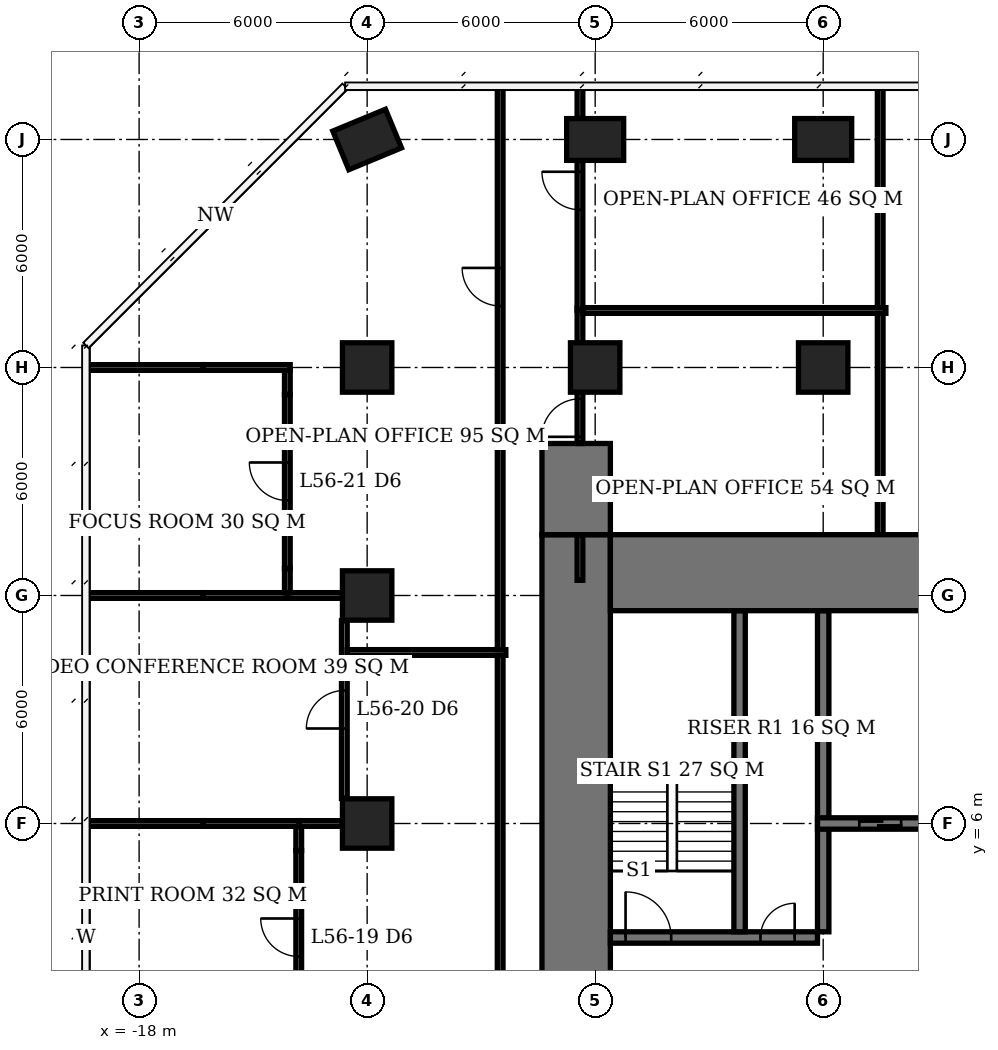
"""IFC4 building model, lengths in metres.
Left out: names, types, materials, properties, quantities, classifications, styles, units other than length and angle.
Written with IfcOpenShell. Run it as: python <this file> out.ifc"""

import sys

from ifc_helpers import new_model, si_unit, direction, frame, frame_2d, origin, origin_2d, place, context, subcontext, project, spatial, rectangle, extrude, element, fill, save


model = new_model("IFC4")
c1 = context("Model", 3, precision=1e-05, world=origin(), true_north=direction((0.0, 1.0)))
c2 = subcontext(c1, "Body", "Model", "MODEL_VIEW")
j1 = project(units=[si_unit("LENGTHUNIT", "METRE"), si_unit("PLANEANGLEUNIT", "RADIAN")], contexts=[c1])
p1 = place(None, origin())
s1 = spatial("IfcSite", under=j1, at=p1, CompositionType="ELEMENT")
p2 = place(p1, origin())
s2 = spatial("IfcBuilding", under=s1, at=p2, CompositionType="ELEMENT")
p3 = place(p2, frame((0.0, 0.0, 227.9)))
s3 = spatial("IfcBuildingStorey", under=s2, at=p3, CompositionType="ELEMENT", Elevation=227.9)
for number, where, z_axis, x_axis in (
    (1, (-12.0, 6.0, 0.0), (0.0, 0.0, 1.0), (1.0, 0.0, 0.0)),
    (2, (-12.0, 12.0, 0.0), (0.0, 0.0, 1.0), (1.0, 0.0, 0.0)),
    (3, (-12.0, 18.0, 0.0), (0.0, 0.0, 1.0), (1.0, 0.0, 0.0)),
):
    element("IfcColumn", number, at=place(p3, frame(where, z_axis=z_axis, x_axis=x_axis)), inside=s3, PredefinedType="COLUMN", context=c2, shape_type="SweptSolid", body=[
        extrude(rectangle(XDim=1.3, YDim=1.3, at=origin_2d()), origin(), (0.0, 0.0, 1.0), 3.9),
    ])
p4 = place(p3, frame((-12.0, 24.0, 0.0), z_axis=(0.0, 0.0, 1.0), x_axis=(0.923879532511, 0.382683432365, 0.0)))
e4 = element("IfcColumn", 4, at=p4, inside=s3, PredefinedType="COLUMN", context=c2, shape_type="SweptSolid", body=[
    extrude(rectangle(XDim=1.5, YDim=1.1, at=origin_2d()), origin(), (0.0, 0.0, 1.0), 3.9),
])
p5 = place(p3, frame((-6.0, 18.0, 0.0), z_axis=(0.0, 0.0, 1.0), x_axis=(1.0, 0.0, 0.0)))
e5 = element("IfcColumn", 5, at=p5, inside=s3, PredefinedType="COLUMN", context=c2, shape_type="SweptSolid", body=[
    extrude(rectangle(XDim=1.3, YDim=1.3, at=origin_2d()), origin(), (0.0, 0.0, 1.0), 3.9),
])
p6 = place(p3, frame((-6.0, 24.0, 0.0), z_axis=(0.0, 0.0, 1.0), x_axis=(1.0, 0.0, 0.0)))
e6 = element("IfcColumn", 6, at=p6, inside=s3, PredefinedType="COLUMN", context=c2, shape_type="SweptSolid", body=[
    extrude(rectangle(XDim=1.5, YDim=1.1, at=origin_2d()), origin(), (0.0, 0.0, 1.0), 3.9),
])
p7 = place(p3, frame((0.0, 18.0, 0.0), z_axis=(0.0, 0.0, 1.0), x_axis=(1.0, 0.0, 0.0)))
e7 = element("IfcColumn", 7, at=p7, inside=s3, PredefinedType="COLUMN", context=c2, shape_type="SweptSolid", body=[
    extrude(rectangle(XDim=1.3, YDim=1.3, at=origin_2d()), origin(), (0.0, 0.0, 1.0), 3.9),
])
p8 = place(p3, frame((0.0, 24.0, 0.0), z_axis=(0.0, 0.0, 1.0), x_axis=(1.0, 0.0, 0.0)))
e8 = element("IfcColumn", 8, at=p8, inside=s3, PredefinedType="COLUMN", context=c2, shape_type="SweptSolid", body=[
    extrude(rectangle(XDim=1.5, YDim=1.1, at=origin_2d()), origin(), (0.0, 0.0, 1.0), 3.9),
])
p9 = place(p3, frame((-5.6, 12.6, 0.0), z_axis=(0.0, 0.0, 1.0), x_axis=(1.0, 0.0, 0.0)))
e9 = element("IfcWall", 9, at=p9, inside=s3, PredefinedType="SHEAR", context=c2, shape_type="SweptSolid", body=[
    extrude(rectangle(XDim=23.2, YDim=2.0, at=frame_2d((11.6, 0.0))), origin(), (0.0, 0.0, 1.0), 3.9),
])
p10 = place(p3, frame((-6.5, -7.6, 0.0), z_axis=(0.0, 0.0, 1.0), x_axis=(0.0, 1.0, 0.0)))
e10 = element("IfcWall", 10, at=p10, inside=s3, PredefinedType="SHEAR", context=c2, shape_type="SweptSolid", body=[
    extrude(rectangle(XDim=21.2, YDim=1.8, at=frame_2d((10.6, 0.0))), origin(), (0.0, 0.0, 1.0), 3.9),
])
p11 = place(p10, frame((7.8, 0.0, 0.0)))
e11 = element("IfcOpeningElement", 11, at=p11, cuts=e10, PredefinedType="OPENING", context=c2, shape_type="SweptSolid", body=[
    extrude(rectangle(XDim=1.8, YDim=2.4, at=frame_2d((0.9, 1.2))), frame((0.0, 0.91, 0.0), z_axis=(0.0, -1.0, 0.0), x_axis=(1.0, 0.0, 0.0)), (0.0, 0.0, 1.0), 1.82),
])
p12 = place(p3, frame((-6.5, 13.6, 0.0), z_axis=(0.0, 0.0, 1.0), x_axis=(0.0, 1.0, 0.0)))
e12 = element("IfcWall", 12, at=p12, inside=s3, PredefinedType="SHEAR", context=c2, shape_type="SweptSolid", body=[
    extrude(rectangle(XDim=2.4, YDim=1.8, at=frame_2d((1.2, 0.0))), origin(), (0.0, 0.0, 1.0), 3.9),
])
p13 = place(p3, frame((-5.6, 3.0, 0.0), z_axis=(0.0, 0.0, 1.0), x_axis=(1.0, 0.0, 0.0)))
e13 = element("IfcWall", 13, at=p13, inside=s3, PredefinedType="SHEAR", context=c2, shape_type="SweptSolid", body=[
    extrude(rectangle(XDim=5.45, YDim=0.3, at=frame_2d((2.725, 0.0))), origin(), (0.0, 0.0, 1.0), 3.9),
])
p14 = place(p13, frame((0.4, 0.0, 0.0)))
e14 = element("IfcOpeningElement", 14, at=p14, cuts=e13, PredefinedType="OPENING", context=c2, shape_type="SweptSolid", body=[
    extrude(rectangle(XDim=1.2, YDim=2.1, at=frame_2d((0.6, 1.05))), frame((0.0, 0.16, 0.0), z_axis=(0.0, -1.0, 0.0), x_axis=(1.0, 0.0, 0.0)), (0.0, 0.0, 1.0), 0.32),
])
p15 = place(p13, frame((3.95, 0.0, 0.0)))
e15 = element("IfcOpeningElement", 15, at=p15, cuts=e13, PredefinedType="OPENING", context=c2, shape_type="SweptSolid", body=[
    extrude(rectangle(XDim=0.9, YDim=2.1, at=frame_2d((0.45, 1.05))), frame((0.0, 0.16, 0.0), z_axis=(0.0, -1.0, 0.0), x_axis=(1.0, 0.0, 0.0)), (0.0, 0.0, 1.0), 0.32),
])
p16 = place(p3, frame((-0.15, 6.0, 0.0), z_axis=(0.0, 0.0, 1.0), x_axis=(1.0, 0.0, 0.0)))
e16 = element("IfcWall", 16, at=p16, inside=s3, PredefinedType="SHEAR", context=c2, shape_type="SweptSolid", body=[
    extrude(rectangle(XDim=17.75, YDim=0.3, at=frame_2d((8.875, 0.0))), origin(), (0.0, 0.0, 1.0), 3.9),
])
p17 = place(p16, frame((13.15, 0.0, 0.0)))
e17 = element("IfcOpeningElement", 17, at=p17, cuts=e16, PredefinedType="OPENING", context=c2, shape_type="SweptSolid", body=[
    extrude(rectangle(XDim=0.9, YDim=2.1, at=frame_2d((0.45, 1.05))), frame((0.0, 0.16, 0.0), z_axis=(0.0, -1.0, 0.0), x_axis=(1.0, 0.0, 0.0)), (0.0, 0.0, 1.0), 0.32),
])
p18 = place(p16, frame((16.25, 0.0, 0.0)))
e18 = element("IfcOpeningElement", 18, at=p18, cuts=e16, PredefinedType="OPENING", context=c2, shape_type="SweptSolid", body=[
    extrude(rectangle(XDim=1.0, YDim=2.1, at=frame_2d((0.5, 1.05))), frame((0.0, 0.16, 0.0), z_axis=(0.0, -1.0, 0.0), x_axis=(1.0, 0.0, 0.0)), (0.0, 0.0, 1.0), 0.32),
])
p19 = place(p16, frame((7.25, 0.0, 0.0)))
e19 = element("IfcOpeningElement", 19, at=p19, cuts=e16, PredefinedType="OPENING", context=c2, shape_type="SweptSolid", body=[
    extrude(rectangle(XDim=1.0, YDim=2.1, at=frame_2d((0.5, 1.05))), frame((0.0, 0.16, 0.0), z_axis=(0.0, -1.0, 0.0), x_axis=(1.0, 0.0, 0.0)), (0.0, 0.0, 1.0), 0.32),
])
p20 = place(p16, frame((1.1, 0.0, 0.0)))
e20 = element("IfcOpeningElement", 20, at=p20, cuts=e16, PredefinedType="OPENING", context=c2, shape_type="SweptSolid", body=[
    extrude(rectangle(XDim=1.1, YDim=2.1, at=frame_2d((0.55, 1.05))), frame((0.0, 0.16, 0.0), z_axis=(0.0, -1.0, 0.0), x_axis=(1.0, 0.0, 0.0)), (0.0, 0.0, 1.0), 0.32),
])
p21 = place(p16, frame((4.1, 0.0, 0.0)))
e21 = element("IfcOpeningElement", 21, at=p21, cuts=e16, PredefinedType="OPENING", context=c2, shape_type="SweptSolid", body=[
    extrude(rectangle(XDim=1.1, YDim=2.1, at=frame_2d((0.55, 1.05))), frame((0.0, 0.16, 0.0), z_axis=(0.0, -1.0, 0.0), x_axis=(1.0, 0.0, 0.0)), (0.0, 0.0, 1.0), 0.32),
])
for number, where, z_axis, x_axis in (
    (22, (0.0, 3.15, 0.0), (0.0, 0.0, 1.0), (0.0, 1.0, 0.0)),
    (23, (-2.2, 3.15, 0.0), (0.0, 0.0, 1.0), (0.0, 1.0, 0.0)),
):
    element("IfcWall", number, at=place(p3, frame(where, z_axis=z_axis, x_axis=x_axis)), inside=s3, PredefinedType="SHEAR", context=c2, shape_type="SweptSolid", body=[
        extrude(rectangle(XDim=8.45, YDim=0.3, at=frame_2d((4.225, 0.0))), origin(), (0.0, 0.0, 1.0), 3.9),
    ])
p22 = place(p3, frame((-19.35, 6.0, 0.0), z_axis=(0.0, 0.0, 1.0), x_axis=(1.0, 0.0, 0.0)))
e24 = element("IfcWall", 24, at=p22, inside=s3, PredefinedType="PARTITIONING", context=c2, shape_type="SweptSolid", body=[
    extrude(rectangle(XDim=3.04, YDim=0.15, at=frame_2d((1.52, 0.0))), origin(), (0.0, 0.0, 1.0), 3.65),
])
p23 = place(p3, frame((-16.31, 6.0, 0.0), z_axis=(0.0, 0.0, 1.0), x_axis=(1.0, 0.0, 0.0)))
e25 = element("IfcWall", 25, at=p23, inside=s3, PredefinedType="PARTITIONING", context=c2, shape_type="SweptSolid", body=[
    extrude(rectangle(XDim=2.585, YDim=0.15, at=frame_2d((1.292, 0.0))), origin(), (0.0, 0.0, 1.0), 2.65),
])
p24 = place(p3, frame((-13.8, 6.0, 0.0), z_axis=(0.0, 0.0, 1.0), x_axis=(1.0, 0.0, 0.0)))
e26 = element("IfcWall", 26, at=p24, inside=s3, PredefinedType="PARTITIONING", context=c2, shape_type="SweptSolid", body=[
    extrude(rectangle(XDim=1.15, YDim=0.15, at=frame_2d((0.575, 0.0))), origin(), (0.0, 0.0, 1.0), 2.65),
])
p25 = place(p3, frame((-19.4, 12.0, 0.0), z_axis=(0.0, 0.0, 1.0), x_axis=(1.0, 0.0, 0.0)))
e27 = element("IfcWall", 27, at=p25, inside=s3, PredefinedType="PARTITIONING", context=c2, shape_type="SweptSolid", body=[
    extrude(rectangle(XDim=3.09, YDim=0.15, at=frame_2d((1.545, 0.0))), origin(), (0.0, 0.0, 1.0), 3.65),
])
p26 = place(p3, frame((-16.31, 12.0, 0.0), z_axis=(0.0, 0.0, 1.0), x_axis=(1.0, 0.0, 0.0)))
e28 = element("IfcWall", 28, at=p26, inside=s3, PredefinedType="PARTITIONING", context=c2, shape_type="SweptSolid", body=[
    extrude(rectangle(XDim=2.285, YDim=0.15, at=frame_2d((1.143, 0.0))), origin(), (0.0, 0.0, 1.0), 2.65),
])
p27 = place(p3, frame((-14.1, 12.0, 0.0), z_axis=(0.0, 0.0, 1.0), x_axis=(1.0, 0.0, 0.0)))
e29 = element("IfcWall", 29, at=p27, inside=s3, PredefinedType="PARTITIONING", context=c2, shape_type="SweptSolid", body=[
    extrude(rectangle(XDim=1.45, YDim=0.15, at=frame_2d((0.725, 0.0))), origin(), (0.0, 0.0, 1.0), 2.65),
])
p28 = place(p3, frame((-19.4, 18.0, 0.0), z_axis=(0.0, 0.0, 1.0), x_axis=(1.0, 0.0, 0.0)))
e30 = element("IfcWall", 30, at=p28, inside=s3, PredefinedType="PARTITIONING", context=c2, shape_type="SweptSolid", body=[
    extrude(rectangle(XDim=3.09, YDim=0.15, at=frame_2d((1.545, 0.0))), origin(), (0.0, 0.0, 1.0), 3.65),
])
p29 = place(p3, frame((-16.31, 18.0, 0.0), z_axis=(0.0, 0.0, 1.0), x_axis=(1.0, 0.0, 0.0)))
e31 = element("IfcWall", 31, at=p29, inside=s3, PredefinedType="PARTITIONING", context=c2, shape_type="SweptSolid", body=[
    extrude(rectangle(XDim=2.285, YDim=0.15, at=frame_2d((1.143, 0.0))), origin(), (0.0, 0.0, 1.0), 2.65),
])
p30 = place(p3, frame((-14.1, 12.075, 0.0), z_axis=(0.0, 0.0, 1.0), x_axis=(0.0, 1.0, 0.0)))
e32 = element("IfcWall", 32, at=p30, inside=s3, PredefinedType="PARTITIONING", context=c2, shape_type="SweptSolid", body=[
    extrude(rectangle(XDim=0.635, YDim=0.15, at=frame_2d((0.317, 0.0))), origin(), (0.0, 0.0, 1.0), 2.65),
])
p31 = place(p3, frame((-14.1, 12.71, 0.0), z_axis=(0.0, 0.0, 1.0), x_axis=(0.0, 1.0, 0.0)))
e33 = element("IfcWall", 33, at=p31, inside=s3, PredefinedType="PARTITIONING", context=c2, shape_type="SweptSolid", body=[
    extrude(rectangle(XDim=4.58, YDim=0.15, at=frame_2d((2.29, 0.0))), origin(), (0.0, 0.0, 1.0), 3.65),
])
p32 = place(p31, frame((1.79, 0.0, 0.0)))
e34 = element("IfcOpeningElement", 34, at=p32, cuts=e33, PredefinedType="OPENING", context=c2, shape_type="SweptSolid", body=[
    extrude(rectangle(XDim=1.0, YDim=2.1, at=frame_2d((0.5, 1.05))), frame((0.0, 0.085, 0.0), z_axis=(0.0, -1.0, 0.0), x_axis=(1.0, 0.0, 0.0)), (0.0, 0.0, 1.0), 0.17),
])
p33 = place(p3, frame((-14.1, 17.29, 0.0), z_axis=(0.0, 0.0, 1.0), x_axis=(0.0, 1.0, 0.0)))
e35 = element("IfcWall", 35, at=p33, inside=s3, PredefinedType="PARTITIONING", context=c2, shape_type="SweptSolid", body=[
    extrude(rectangle(XDim=0.635, YDim=0.15, at=frame_2d((0.317, 0.0))), origin(), (0.0, 0.0, 1.0), 2.65),
])
p34 = place(p3, frame((-13.8, 0.71, 0.0), z_axis=(0.0, 0.0, 1.0), x_axis=(0.0, 1.0, 0.0)))
e36 = element("IfcWall", 36, at=p34, inside=s3, PredefinedType="PARTITIONING", context=c2, shape_type="SweptSolid", body=[
    extrude(rectangle(XDim=4.58, YDim=0.15, at=frame_2d((2.29, 0.0))), origin(), (0.0, 0.0, 1.0), 3.65),
])
p35 = place(p34, frame((1.79, 0.0, 0.0)))
e37 = element("IfcOpeningElement", 37, at=p35, cuts=e36, PredefinedType="OPENING", context=c2, shape_type="SweptSolid", body=[
    extrude(rectangle(XDim=1.0, YDim=2.1, at=frame_2d((0.5, 1.05))), frame((0.0, 0.085, 0.0), z_axis=(0.0, -1.0, 0.0), x_axis=(1.0, 0.0, 0.0)), (0.0, 0.0, 1.0), 0.17),
])
p36 = place(p3, frame((-13.8, 5.29, 0.0), z_axis=(0.0, 0.0, 1.0), x_axis=(0.0, 1.0, 0.0)))
e38 = element("IfcWall", 38, at=p36, inside=s3, PredefinedType="PARTITIONING", context=c2, shape_type="SweptSolid", body=[
    extrude(rectangle(XDim=0.635, YDim=0.15, at=frame_2d((0.317, 0.0))), origin(), (0.0, 0.0, 1.0), 2.65),
])
p37 = place(p3, frame((-12.6, 6.66, 0.0), z_axis=(0.0, 0.0, 1.0), x_axis=(0.0, 1.0, 0.0)))
e39 = element("IfcWall", 39, at=p37, inside=s3, PredefinedType="PARTITIONING", context=c2, shape_type="SweptSolid", body=[
    extrude(rectangle(XDim=4.68, YDim=0.15, at=frame_2d((2.34, 0.0))), origin(), (0.0, 0.0, 1.0), 3.65),
])
p38 = place(p37, frame((1.84, 0.0, 0.0)))
e40 = element("IfcOpeningElement", 40, at=p38, cuts=e39, PredefinedType="OPENING", context=c2, shape_type="SweptSolid", body=[
    extrude(rectangle(XDim=1.0, YDim=2.1, at=frame_2d((0.5, 1.05))), frame((0.0, 0.085, 0.0), z_axis=(0.0, -1.0, 0.0), x_axis=(1.0, 0.0, 0.0)), (0.0, 0.0, 1.0), 0.17),
])
p39 = place(p3, frame((-12.525, 10.5, 0.0), z_axis=(0.0, 0.0, 1.0), x_axis=(1.0, 0.0, 0.0)))
e41 = element("IfcWall", 41, at=p39, inside=s3, PredefinedType="PARTITIONING", context=c2, shape_type="SweptSolid", body=[
    extrude(rectangle(XDim=4.175, YDim=0.15, at=frame_2d((2.087, 0.0))), origin(), (0.0, 0.0, 1.0), 3.65),
])
p40 = place(p3, frame((-8.5, -12.708, 0.0), z_axis=(0.0, 0.0, 1.0), x_axis=(0.0, 1.0, 0.0)))
e42 = element("IfcWall", 42, at=p40, inside=s3, PredefinedType="PARTITIONING", context=c2, shape_type="SweptSolid", body=[
    extrude(rectangle(XDim=23.133, YDim=0.15, at=frame_2d((11.566, 0.0))), origin(), (0.0, 0.0, 1.0), 3.65),
])
p41 = place(p40, frame((12.278, 0.0, 0.0)))
e43 = element("IfcOpeningElement", 43, at=p41, cuts=e42, PredefinedType="OPENING", context=c2, shape_type="SweptSolid", body=[
    extrude(rectangle(XDim=1.0, YDim=2.1, at=frame_2d((0.5, 1.05))), frame((0.0, 0.085, 0.0), z_axis=(0.0, -1.0, 0.0), x_axis=(1.0, 0.0, 0.0)), (0.0, 0.0, 1.0), 0.17),
])
p42 = place(p3, frame((-8.5, 10.575, 0.0), z_axis=(0.0, 0.0, 1.0), x_axis=(0.0, 1.0, 0.0)))
e44 = element("IfcWall", 44, at=p42, inside=s3, PredefinedType="PARTITIONING", context=c2, shape_type="SweptSolid", body=[
    extrude(rectangle(XDim=14.825, YDim=0.15, at=frame_2d((7.413, 0.0))), origin(), (0.0, 0.0, 1.0), 3.65),
])
p43 = place(p42, frame((9.045, 0.0, 0.0)))
e45 = element("IfcOpeningElement", 45, at=p43, cuts=e44, PredefinedType="OPENING", context=c2, shape_type="SweptSolid", body=[
    extrude(rectangle(XDim=1.0, YDim=2.1, at=frame_2d((0.5, 1.05))), frame((0.0, 0.085, 0.0), z_axis=(0.0, -1.0, 0.0), x_axis=(1.0, 0.0, 0.0)), (0.0, 0.0, 1.0), 0.17),
])
p44 = place(p3, frame((-6.4, 12.4, 0.0), z_axis=(0.0, 0.0, 1.0), x_axis=(0.0, 1.0, 0.0)))
e46 = element("IfcWall", 46, at=p44, inside=s3, PredefinedType="PARTITIONING", context=c2, shape_type="SweptSolid", body=[
    extrude(rectangle(XDim=1.2, YDim=0.15, at=frame_2d((0.6, 0.0))), origin(), (0.0, 0.0, 1.0), 3.65),
])
p45 = place(p3, frame((-6.4, 16.0, 0.0), z_axis=(0.0, 0.0, 1.0), x_axis=(0.0, 1.0, 0.0)))
e47 = element("IfcWall", 47, at=p45, inside=s3, PredefinedType="PARTITIONING", context=c2, shape_type="SweptSolid", body=[
    extrude(rectangle(XDim=1.35, YDim=0.15, at=frame_2d((0.675, 0.0))), origin(), (0.0, 0.0, 1.0), 3.65),
])
p46 = place(p45, frame((0.175, 0.0, 0.0)))
e48 = element("IfcOpeningElement", 48, at=p46, cuts=e47, PredefinedType="OPENING", context=c2, shape_type="SweptSolid", body=[
    extrude(rectangle(XDim=1.0, YDim=2.1, at=frame_2d((0.5, 1.05))), frame((0.0, 0.085, 0.0), z_axis=(0.0, -1.0, 0.0), x_axis=(1.0, 0.0, 0.0)), (0.0, 0.0, 1.0), 0.17),
])
p47 = place(p3, frame((-6.4, 18.65, 0.0), z_axis=(0.0, 0.0, 1.0), x_axis=(0.0, 1.0, 0.0)))
e49 = element("IfcWall", 49, at=p47, inside=s3, PredefinedType="PARTITIONING", context=c2, shape_type="SweptSolid", body=[
    extrude(rectangle(XDim=0.925, YDim=0.15, at=frame_2d((0.462, 0.0))), origin(), (0.0, 0.0, 1.0), 3.65),
])
p48 = place(p3, frame((-6.4, 19.5, 0.0), z_axis=(0.0, 0.0, 1.0), x_axis=(0.0, 1.0, 0.0)))
e50 = element("IfcWall", 50, at=p48, inside=s3, PredefinedType="PARTITIONING", context=c2, shape_type="SweptSolid", body=[
    extrude(rectangle(XDim=3.95, YDim=0.15, at=frame_2d((1.975, 0.0))), origin(), (0.0, 0.0, 1.0), 3.65),
])
p49 = place(p48, frame((2.65, 0.0, 0.0)))
e51 = element("IfcOpeningElement", 51, at=p49, cuts=e50, PredefinedType="OPENING", context=c2, shape_type="SweptSolid", body=[
    extrude(rectangle(XDim=1.0, YDim=2.1, at=frame_2d((0.5, 1.05))), frame((0.0, 0.085, 0.0), z_axis=(0.0, -1.0, 0.0), x_axis=(1.0, 0.0, 0.0)), (0.0, 0.0, 1.0), 0.17),
])
p50 = place(p3, frame((-6.4, 24.55, 0.0), z_axis=(0.0, 0.0, 1.0), x_axis=(0.0, 1.0, 0.0)))
e52 = element("IfcWall", 52, at=p50, inside=s3, PredefinedType="PARTITIONING", context=c2, shape_type="SweptSolid", body=[
    extrude(rectangle(XDim=0.8, YDim=0.15, at=frame_2d((0.4, 0.0))), origin(), (0.0, 0.0, 1.0), 3.65),
])
p51 = place(p3, frame((-6.325, 19.5, 0.0), z_axis=(0.0, 0.0, 1.0), x_axis=(1.0, 0.0, 0.0)))
e53 = element("IfcWall", 53, at=p51, inside=s3, PredefinedType="PARTITIONING", context=c2, shape_type="SweptSolid", body=[
    extrude(rectangle(XDim=7.975, YDim=0.15, at=frame_2d((3.987, 0.0))), origin(), (0.0, 0.0, 1.0), 3.65),
])
p52 = place(p3, frame((1.5, 12.4, 0.0), z_axis=(0.0, 0.0, 1.0), x_axis=(0.0, 1.0, 0.0)))
e54 = element("IfcWall", 54, at=p52, inside=s3, PredefinedType="PARTITIONING", context=c2, shape_type="SweptSolid", body=[
    extrude(rectangle(XDim=7.025, YDim=0.15, at=frame_2d((3.513, 0.0))), origin(), (0.0, 0.0, 1.0), 3.65),
])
p53 = place(p3, frame((1.5, 19.575, 0.0), z_axis=(0.0, 0.0, 1.0), x_axis=(0.0, 1.0, 0.0)))
e55 = element("IfcWall", 55, at=p53, inside=s3, PredefinedType="PARTITIONING", context=c2, shape_type="SweptSolid", body=[
    extrude(rectangle(XDim=5.825, YDim=0.15, at=frame_2d((2.913, 0.0))), origin(), (0.0, 0.0, 1.0), 3.65),
])
p54 = place(p14, origin())
e56 = element("IfcDoor", 56, at=p54, inside=s3, OperationType="SINGLE_SWING_LEFT", PredefinedType="DOOR", context=c2, shape_type="SweptSolid", body=[
    extrude(rectangle(XDim=1.2, YDim=2.1, at=frame_2d((0.6, 1.05))), frame((0.0, 0.025, 0.0), z_axis=(0.0, -1.0, 0.0), x_axis=(1.0, 0.0, 0.0)), (0.0, 0.0, 1.0), 0.05),
])
fill(e14, e56)
p55 = place(p15, origin())
e57 = element("IfcDoor", 57, at=p55, inside=s3, OperationType="SINGLE_SWING_RIGHT", PredefinedType="DOOR", context=c2, shape_type="SweptSolid", body=[
    extrude(rectangle(XDim=0.9, YDim=2.1, at=frame_2d((0.45, 1.05))), frame((0.0, 0.025, 0.0), z_axis=(0.0, -1.0, 0.0), x_axis=(1.0, 0.0, 0.0)), (0.0, 0.0, 1.0), 0.05),
])
fill(e15, e57)
p56 = place(p20, origin())
e58 = element("IfcDoor", 58, at=p56, inside=s3, OperationType="DOUBLE_DOOR_SLIDING", PredefinedType="USERDEFINED", context=c2, shape_type="SweptSolid", body=[
    extrude(rectangle(XDim=1.1, YDim=2.1, at=frame_2d((0.55, 1.05))), frame((0.0, 0.025, 0.0), z_axis=(0.0, -1.0, 0.0), x_axis=(1.0, 0.0, 0.0)), (0.0, 0.0, 1.0), 0.05),
])
fill(e20, e58)
p57 = place(p35, origin())
e59 = element("IfcDoor", 59, at=p57, inside=s3, OperationType="SINGLE_SWING_RIGHT", PredefinedType="DOOR", context=c2, shape_type="SweptSolid", body=[
    extrude(rectangle(XDim=1.0, YDim=2.1, at=frame_2d((0.5, 1.05))), frame((0.0, 0.025, 0.0), z_axis=(0.0, -1.0, 0.0), x_axis=(1.0, 0.0, 0.0)), (0.0, 0.0, 1.0), 0.05),
])
fill(e37, e59)
p58 = place(p38, origin())
e60 = element("IfcDoor", 60, at=p58, inside=s3, OperationType="SINGLE_SWING_LEFT", PredefinedType="DOOR", context=c2, shape_type="SweptSolid", body=[
    extrude(rectangle(XDim=1.0, YDim=2.1, at=frame_2d((0.5, 1.05))), frame((0.0, 0.025, 0.0), z_axis=(0.0, -1.0, 0.0), x_axis=(1.0, 0.0, 0.0)), (0.0, 0.0, 1.0), 0.05),
])
fill(e40, e60)
p59 = place(p32, origin())
e61 = element("IfcDoor", 61, at=p59, inside=s3, OperationType="SINGLE_SWING_RIGHT", PredefinedType="DOOR", context=c2, shape_type="SweptSolid", body=[
    extrude(rectangle(XDim=1.0, YDim=2.1, at=frame_2d((0.5, 1.05))), frame((0.0, 0.025, 0.0), z_axis=(0.0, -1.0, 0.0), x_axis=(1.0, 0.0, 0.0)), (0.0, 0.0, 1.0), 0.05),
])
fill(e34, e61)
p60 = place(p43, origin())
e62 = element("IfcDoor", 62, at=p60, inside=s3, OperationType="SINGLE_SWING_RIGHT", PredefinedType="DOOR", context=c2, shape_type="SweptSolid", body=[
    extrude(rectangle(XDim=1.0, YDim=2.1, at=frame_2d((0.5, 1.05))), frame((0.0, 0.025, 0.0), z_axis=(0.0, -1.0, 0.0), x_axis=(1.0, 0.0, 0.0)), (0.0, 0.0, 1.0), 0.05),
])
fill(e45, e62)
p61 = place(p49, origin())
e63 = element("IfcDoor", 63, at=p61, inside=s3, OperationType="SINGLE_SWING_RIGHT", PredefinedType="DOOR", context=c2, shape_type="SweptSolid", body=[
    extrude(rectangle(XDim=1.0, YDim=2.1, at=frame_2d((0.5, 1.05))), frame((0.0, 0.025, 0.0), z_axis=(0.0, -1.0, 0.0), x_axis=(1.0, 0.0, 0.0)), (0.0, 0.0, 1.0), 0.05),
])
fill(e51, e63)
p62 = place(p46, origin())
e64 = element("IfcDoor", 64, at=p62, inside=s3, OperationType="SINGLE_SWING_LEFT", PredefinedType="DOOR", context=c2, shape_type="SweptSolid", body=[
    extrude(rectangle(XDim=1.0, YDim=2.1, at=frame_2d((0.5, 1.05))), frame((0.0, 0.025, 0.0), z_axis=(0.0, -1.0, 0.0), x_axis=(1.0, 0.0, 0.0)), (0.0, 0.0, 1.0), 0.05),
])
fill(e48, e64)
save(model, sys.argv[1])
